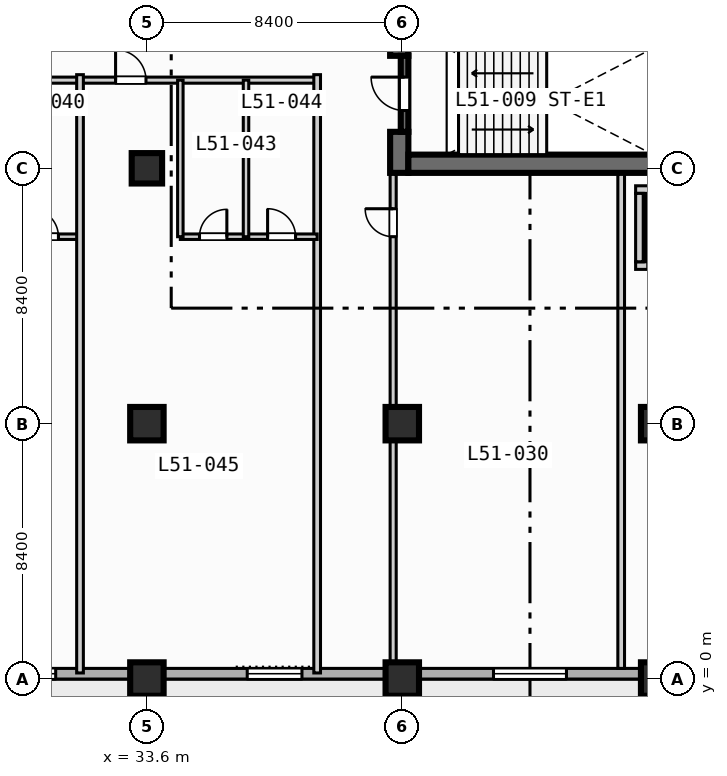
"""IFC4 building model, lengths in metres.
Left out: names, types, materials, properties, quantities, classifications, styles, units other than length and angle.
Written with IfcOpenShell. Run it as: python <this file> out.ifc"""

import sys

from ifc_helpers import new_model, si_unit, direction, frame, frame_2d, origin, origin_2d, place, context, subcontext, project, spatial, rectangle, extrude, element, fill, save


model = new_model("IFC4")
c1 = context("Model", 3, precision=1e-05, world=origin(), true_north=direction((0.0, 1.0)))
c2 = subcontext(c1, "Body", "Model", "MODEL_VIEW")
j1 = project(units=[si_unit("LENGTHUNIT", "METRE"), si_unit("PLANEANGLEUNIT", "RADIAN")], contexts=[c1])
p1 = place(None, origin())
s1 = spatial("IfcSite", under=j1, at=p1, CompositionType="ELEMENT")
p2 = place(p1, origin())
s2 = spatial("IfcBuilding", under=s1, at=p2, CompositionType="ELEMENT")
p3 = place(p2, frame((0.0, 0.0, 208.7)))
s3 = spatial("IfcBuildingStorey", under=s2, at=p3, CompositionType="ELEMENT", Elevation=208.7)
p4 = place(p3, frame((41.9, 16.65, 0.0), z_axis=(0.0, 0.0, 1.0), x_axis=(0.0, 1.0, 0.0)))
e1 = element("IfcWall", 1, at=p4, inside=s3, PredefinedType="SHEAR", context=c2, shape_type="SweptSolid", body=[
    extrude(rectangle(XDim=1.35, YDim=0.6, at=frame_2d((0.675, 0.0))), origin(), (0.0, 0.0, 1.0), 3.47),
])
p5 = place(p3, frame((41.9, 20.5, 0.0), z_axis=(0.0, 0.0, 1.0), x_axis=(0.0, 1.0, 0.0)))
e2 = element("IfcWall", 2, at=p5, inside=s3, PredefinedType="SHEAR", context=c2, shape_type="SweptSolid", body=[
    extrude(rectangle(XDim=5.0, YDim=0.6, at=frame_2d((2.5, 0.0))), origin(), (0.0, 0.0, 1.0), 3.47),
])
p6 = place(p3, frame((42.2, 16.95, 0.0), z_axis=(0.0, 0.0, 1.0), x_axis=(1.0, 0.0, 0.0)))
e3 = element("IfcWall", 3, at=p6, inside=s3, PredefinedType="SHEAR", context=c2, shape_type="SweptSolid", body=[
    extrude(rectangle(XDim=16.35, YDim=0.6, at=frame_2d((8.175, 0.0))), origin(), (0.0, 0.0, 1.0), 3.47),
])
for number, where, z_axis, x_axis in (
    (4, (33.6, 0.0, 0.0), (0.0, 0.0, 1.0), (1.0, 0.0, 0.0)),
    (5, (33.6, 8.4, 0.0), (0.0, 0.0, 1.0), (1.0, 0.0, 0.0)),
):
    element("IfcColumn", number, at=place(p3, frame(where, z_axis=z_axis, x_axis=x_axis)), inside=s3, PredefinedType="COLUMN", context=c2, shape_type="SweptSolid", body=[
        extrude(rectangle(XDim=1.1, YDim=1.1, at=origin_2d()), origin(), (0.0, 0.0, 1.0), 3.7),
    ])
p7 = place(p3, frame((33.6, 16.8, 0.0), z_axis=(0.0, 0.0, 1.0), x_axis=(1.0, 0.0, 0.0)))
e6 = element("IfcColumn", 6, at=p7, inside=s3, PredefinedType="COLUMN", context=c2, shape_type="SweptSolid", body=[
    extrude(rectangle(XDim=1.0, YDim=1.0, at=origin_2d()), origin(), (0.0, 0.0, 1.0), 3.7),
])
for number, where, z_axis, x_axis in (
    (7, (42.0, 0.0, 0.0), (0.0, 0.0, 1.0), (1.0, 0.0, 0.0)),
    (8, (42.0, 8.4, 0.0), (0.0, 0.0, 1.0), (1.0, 0.0, 0.0)),
    (9, (50.4, 0.0, 0.0), (0.0, 0.0, 1.0), (1.0, 0.0, 0.0)),
    (10, (50.4, 8.4, 0.0), (0.0, 0.0, 1.0), (1.0, 0.0, 0.0)),
):
    element("IfcColumn", number, at=place(p3, frame(where, z_axis=z_axis, x_axis=x_axis)), inside=s3, PredefinedType="COLUMN", context=c2, shape_type="SweptSolid", body=[
        extrude(rectangle(XDim=1.1, YDim=1.1, at=origin_2d()), origin(), (0.0, 0.0, 1.0), 3.7),
    ])
p8 = place(p3, frame((72.425, 0.175, 0.0), z_axis=(0.0, 0.0, 1.0), x_axis=(-1.0, 0.0, 0.0)))
e11 = element("IfcWall", 11, at=p8, inside=s3, PredefinedType="STANDARD", context=c2, shape_type="SweptSolid", body=[
    extrude(rectangle(XDim=69.25, YDim=0.35, at=frame_2d((34.625, 0.0))), origin(), (0.0, 0.0, 1.0), 3.47),
])
p9 = place(p8, frame((52.825, 0.0, 0.0)))
e12 = element("IfcOpeningElement", 12, at=p9, cuts=e11, PredefinedType="OPENING", context=c2, shape_type="SweptSolid", body=[
    extrude(rectangle(XDim=1.4, YDim=2.2, at=frame_2d((0.7, 1.1))), frame((0.0, 0.185, 0.0), z_axis=(0.0, -1.0, 0.0), x_axis=(1.0, 0.0, 0.0)), (0.0, 0.0, 1.0), 0.37),
])
p10 = place(p8, frame((41.825, 0.0, 0.85)))
e13 = element("IfcOpeningElement", 13, at=p10, cuts=e11, PredefinedType="OPENING", context=c2, shape_type="SweptSolid", body=[
    extrude(rectangle(XDim=2.4, YDim=1.95, at=frame_2d((1.2, 0.975))), frame((0.0, 0.185, 0.0), z_axis=(0.0, -1.0, 0.0), x_axis=(1.0, 0.0, 0.0)), (0.0, 0.0, 1.0), 0.37),
])
p11 = place(p8, frame((33.725, 0.0, 0.85)))
e14 = element("IfcOpeningElement", 14, at=p11, cuts=e11, PredefinedType="OPENING", context=c2, shape_type="SweptSolid", body=[
    extrude(rectangle(XDim=1.8, YDim=1.8, at=frame_2d((0.9, 0.9))), frame((0.0, 0.185, 0.0), z_axis=(0.0, -1.0, 0.0), x_axis=(1.0, 0.0, 0.0)), (0.0, 0.0, 1.0), 0.37),
])
p12 = place(p8, frame((25.025, 0.0, 0.85)))
e15 = element("IfcOpeningElement", 15, at=p12, cuts=e11, PredefinedType="OPENING", context=c2, shape_type="SweptSolid", body=[
    extrude(rectangle(XDim=2.4, YDim=1.95, at=frame_2d((1.2, 0.975))), frame((0.0, 0.185, 0.0), z_axis=(0.0, -1.0, 0.0), x_axis=(1.0, 0.0, 0.0)), (0.0, 0.0, 1.0), 0.37),
])
p13 = place(p8, frame((64.675, 0.0, 0.85)))
e16 = element("IfcOpeningElement", 16, at=p13, cuts=e11, PredefinedType="OPENING", context=c2, shape_type="SweptSolid", body=[
    extrude(rectangle(XDim=1.8, YDim=1.8, at=frame_2d((0.9, 0.9))), frame((0.0, 0.185, 0.0), z_axis=(0.0, -1.0, 0.0), x_axis=(1.0, 0.0, 0.0)), (0.0, 0.0, 1.0), 0.37),
])
p14 = place(p8, frame((50.275, 0.0, 0.85)))
e17 = element("IfcOpeningElement", 17, at=p14, cuts=e11, PredefinedType="OPENING", context=c2, shape_type="SweptSolid", body=[
    extrude(rectangle(XDim=1.8, YDim=1.8, at=frame_2d((0.9, 0.9))), frame((0.0, 0.185, 0.0), z_axis=(0.0, -1.0, 0.0), x_axis=(1.0, 0.0, 0.0)), (0.0, 0.0, 1.0), 0.37),
])
p15 = place(p3, frame((42.075, 18.0, 0.0), z_axis=(0.0, 0.0, 1.0), x_axis=(0.0, 1.0, 0.0)))
e18 = element("IfcWall", 18, at=p15, inside=s3, PredefinedType="SOLIDWALL", context=c2, shape_type="SweptSolid", body=[
    extrude(rectangle(XDim=2.5, YDim=0.25, at=frame_2d((1.25, 0.0))), origin(), (0.0, 0.0, 1.0), 3.47),
])
p16 = place(p15, frame((0.7, 0.0, 0.0)))
e19 = element("IfcOpeningElement", 19, at=p16, cuts=e18, PredefinedType="OPENING", context=c2, shape_type="SweptSolid", body=[
    extrude(rectangle(XDim=1.1, YDim=2.15, at=frame_2d((0.55, 1.075))), frame((0.0, 0.135, 0.0), z_axis=(0.0, -1.0, 0.0), x_axis=(1.0, 0.0, 0.0)), (0.0, 0.0, 1.0), 0.27),
])
p17 = place(p3, frame((49.675, 13.6, 0.0), z_axis=(0.0, 0.0, 1.0), x_axis=(1.0, 0.0, 0.0)))
e20 = element("IfcWall", 20, at=p17, inside=s3, PredefinedType="SOLIDWALL", context=c2, shape_type="SweptSolid", body=[
    extrude(rectangle(XDim=2.25, YDim=0.25, at=frame_2d((1.125, 0.0))), origin(), (0.0, 0.0, 1.0), 3.47),
])
p18 = place(p17, frame((0.4, 0.0, 0.0)))
e21 = element("IfcOpeningElement", 21, at=p18, cuts=e20, PredefinedType="OPENING", context=c2, shape_type="SweptSolid", body=[
    extrude(rectangle(XDim=1.1, YDim=2.15, at=frame_2d((0.55, 1.075))), frame((0.0, 0.135, 0.0), z_axis=(0.0, -1.0, 0.0), x_axis=(1.0, 0.0, 0.0)), (0.0, 0.0, 1.0), 0.27),
])
for number, where, z_axis, x_axis in (
    (22, (49.675, 16.1, 0.0), (0.0, 0.0, 1.0), (1.0, 0.0, 0.0)),
    (23, (49.8, 13.725, 0.0), (0.0, 0.0, 1.0), (0.0, 1.0, 0.0)),
):
    element("IfcWall", number, at=place(p3, frame(where, z_axis=z_axis, x_axis=x_axis)), inside=s3, PredefinedType="SOLIDWALL", context=c2, shape_type="SweptSolid", body=[
        extrude(rectangle(XDim=2.25, YDim=0.25, at=frame_2d((1.125, 0.0))), origin(), (0.0, 0.0, 1.0), 3.47),
    ])
p19 = place(p3, frame((41.7, 0.35, 0.0), z_axis=(0.0, 0.0, 1.0), x_axis=(0.0, 1.0, 0.0)))
e24 = element("IfcWall", 24, at=p19, inside=s3, PredefinedType="PARTITIONING", context=c2, shape_type="SweptSolid", body=[
    extrude(rectangle(XDim=16.25, YDim=0.2, at=frame_2d((8.125, 0.0))), origin(), (0.0, 0.0, 1.0), 2.82),
])
p20 = place(p19, frame((14.2, 0.0, 0.0)))
e25 = element("IfcOpeningElement", 25, at=p20, cuts=e24, PredefinedType="OPENING", context=c2, shape_type="SweptSolid", body=[
    extrude(rectangle(XDim=0.92, YDim=2.1, at=frame_2d((0.46, 1.05))), frame((0.0, 0.11, 0.0), z_axis=(0.0, -1.0, 0.0), x_axis=(1.0, 0.0, 0.0)), (0.0, 0.0, 1.0), 0.22),
])
p21 = place(p3, frame((49.2, 0.35, 0.0), z_axis=(0.0, 0.0, 1.0), x_axis=(0.0, 1.0, 0.0)))
e26 = element("IfcWall", 26, at=p21, inside=s3, PredefinedType="PARTITIONING", context=c2, shape_type="SweptSolid", body=[
    extrude(rectangle(XDim=16.25, YDim=0.22, at=frame_2d((8.125, 0.0))), origin(), (0.0, 0.0, 1.0), 3.47),
])
p22 = place(p3, frame((3.4, 19.7, 0.0), z_axis=(0.0, 0.0, 1.0), x_axis=(1.0, 0.0, 0.0)))
e27 = element("IfcWall", 27, at=p22, inside=s3, PredefinedType="PARTITIONING", context=c2, shape_type="SweptSolid", body=[
    extrude(rectangle(XDim=35.8, YDim=0.2, at=frame_2d((17.9, 0.0))), origin(), (0.0, 0.0, 1.0), 3.47),
])
p23 = place(p22, frame((1.47, 0.0, 0.0)))
e28 = element("IfcOpeningElement", 28, at=p23, cuts=e27, PredefinedType="OPENING", context=c2, shape_type="SweptSolid", body=[
    extrude(rectangle(XDim=1.0, YDim=2.15, at=frame_2d((0.5, 1.075))), frame((0.0, 0.11, 0.0), z_axis=(0.0, -1.0, 0.0), x_axis=(1.0, 0.0, 0.0)), (0.0, 0.0, 1.0), 0.22),
])
p24 = place(p22, frame((9.87, 0.0, 0.0)))
e29 = element("IfcOpeningElement", 29, at=p24, cuts=e27, PredefinedType="OPENING", context=c2, shape_type="SweptSolid", body=[
    extrude(rectangle(XDim=1.0, YDim=2.15, at=frame_2d((0.5, 1.075))), frame((0.0, 0.11, 0.0), z_axis=(0.0, -1.0, 0.0), x_axis=(1.0, 0.0, 0.0)), (0.0, 0.0, 1.0), 0.22),
])
p25 = place(p22, frame((20.72, 0.0, 0.0)))
e30 = element("IfcOpeningElement", 30, at=p25, cuts=e27, PredefinedType="OPENING", context=c2, shape_type="SweptSolid", body=[
    extrude(rectangle(XDim=1.0, YDim=2.15, at=frame_2d((0.5, 1.075))), frame((0.0, 0.11, 0.0), z_axis=(0.0, -1.0, 0.0), x_axis=(1.0, 0.0, 0.0)), (0.0, 0.0, 1.0), 0.22),
])
p26 = place(p22, frame((29.17, 0.0, 0.0)))
e31 = element("IfcOpeningElement", 31, at=p26, cuts=e27, PredefinedType="OPENING", context=c2, shape_type="SweptSolid", body=[
    extrude(rectangle(XDim=1.0, YDim=2.15, at=frame_2d((0.5, 1.075))), frame((0.0, 0.11, 0.0), z_axis=(0.0, -1.0, 0.0), x_axis=(1.0, 0.0, 0.0)), (0.0, 0.0, 1.0), 0.22),
])
p27 = place(p3, frame((26.9, 14.55, 0.0), z_axis=(0.0, 0.0, 1.0), x_axis=(1.0, 0.0, 0.0)))
e32 = element("IfcWall", 32, at=p27, inside=s3, PredefinedType="PLUMBINGWALL", context=c2, shape_type="SweptSolid", body=[
    extrude(rectangle(XDim=4.5, YDim=0.18, at=frame_2d((2.25, 0.0))), origin(), (0.0, 0.0, 1.0), 3.47),
])
p28 = place(p27, frame((0.63, 0.0, 0.0)))
e33 = element("IfcOpeningElement", 33, at=p28, cuts=e32, PredefinedType="OPENING", context=c2, shape_type="SweptSolid", body=[
    extrude(rectangle(XDim=0.9, YDim=2.1, at=frame_2d((0.45, 1.05))), frame((0.0, 0.1, 0.0), z_axis=(0.0, -1.0, 0.0), x_axis=(1.0, 0.0, 0.0)), (0.0, 0.0, 1.0), 0.2),
])
p29 = place(p27, frame((2.87, 0.0, 0.0)))
e34 = element("IfcOpeningElement", 34, at=p29, cuts=e32, PredefinedType="OPENING", context=c2, shape_type="SweptSolid", body=[
    extrude(rectangle(XDim=0.92, YDim=2.1, at=frame_2d((0.46, 1.05))), frame((0.0, 0.1, 0.0), z_axis=(0.0, -1.0, 0.0), x_axis=(1.0, 0.0, 0.0)), (0.0, 0.0, 1.0), 0.2),
])
for number, where, z_axis, x_axis in (
    (35, (31.4, 0.2, 0.0), (0.0, 0.0, 1.0), (0.0, 1.0, 0.0)),
    (36, (39.2, 0.2, 0.0), (0.0, 0.0, 1.0), (0.0, 1.0, 0.0)),
):
    element("IfcWall", number, at=place(p3, frame(where, z_axis=z_axis, x_axis=x_axis)), inside=s3, PredefinedType="PARTITIONING", context=c2, shape_type="SweptSolid", body=[
        extrude(rectangle(XDim=19.68, YDim=0.22, at=frame_2d((9.84, 0.0))), origin(), (0.0, 0.0, 1.0), 3.47),
    ])
p30 = place(p3, frame((34.7, 14.55, 0.0), z_axis=(0.0, 0.0, 1.0), x_axis=(1.0, 0.0, 0.0)))
e37 = element("IfcWall", 37, at=p30, inside=s3, PredefinedType="PLUMBINGWALL", context=c2, shape_type="SweptSolid", body=[
    extrude(rectangle(XDim=4.5, YDim=0.18, at=frame_2d((2.25, 0.0))), origin(), (0.0, 0.0, 1.0), 3.47),
])
p31 = place(p30, frame((0.63, 0.0, 0.0)))
e38 = element("IfcOpeningElement", 38, at=p31, cuts=e37, PredefinedType="OPENING", context=c2, shape_type="SweptSolid", body=[
    extrude(rectangle(XDim=0.9, YDim=2.1, at=frame_2d((0.45, 1.05))), frame((0.0, 0.1, 0.0), z_axis=(0.0, -1.0, 0.0), x_axis=(1.0, 0.0, 0.0)), (0.0, 0.0, 1.0), 0.2),
])
p32 = place(p30, frame((2.87, 0.0, 0.0)))
e39 = element("IfcOpeningElement", 39, at=p32, cuts=e37, PredefinedType="OPENING", context=c2, shape_type="SweptSolid", body=[
    extrude(rectangle(XDim=0.92, YDim=2.1, at=frame_2d((0.46, 1.05))), frame((0.0, 0.1, 0.0), z_axis=(0.0, -1.0, 0.0), x_axis=(1.0, 0.0, 0.0)), (0.0, 0.0, 1.0), 0.2),
])
for number, where, z_axis, x_axis in (
    (40, (34.7, 14.55, 0.0), (0.0, 0.0, 1.0), (0.0, 1.0, 0.0)),
    (41, (36.86, 14.55, 0.0), (0.0, 0.0, 1.0), (0.0, 1.0, 0.0)),
):
    element("IfcWall", number, at=place(p3, frame(where, z_axis=z_axis, x_axis=x_axis)), inside=s3, PredefinedType="PLUMBINGWALL", context=c2, shape_type="SweptSolid", body=[
        extrude(rectangle(XDim=5.15, YDim=0.18, at=frame_2d((2.575, 0.0))), origin(), (0.0, 0.0, 1.0), 3.47),
    ])
p33 = place(p10, origin())
e42 = element("IfcWindow", 42, at=p33, inside=s3, PartitioningType="SINGLE_PANEL", PredefinedType="WINDOW", context=c2, shape_type="SweptSolid", body=[
    extrude(rectangle(XDim=2.4, YDim=1.95, at=frame_2d((1.2, 0.975))), frame((0.0, 0.03, 0.0), z_axis=(0.0, -1.0, 0.0), x_axis=(1.0, 0.0, 0.0)), (0.0, 0.0, 1.0), 0.06),
])
fill(e13, e42)
p34 = place(p11, origin())
e43 = element("IfcWindow", 43, at=p34, inside=s3, PartitioningType="SINGLE_PANEL", PredefinedType="WINDOW", context=c2, shape_type="SweptSolid", body=[
    extrude(rectangle(XDim=1.8, YDim=1.8, at=frame_2d((0.9, 0.9))), frame((0.0, 0.03, 0.0), z_axis=(0.0, -1.0, 0.0), x_axis=(1.0, 0.0, 0.0)), (0.0, 0.0, 1.0), 0.06),
])
fill(e14, e43)
p35 = place(p12, origin())
e44 = element("IfcWindow", 44, at=p35, inside=s3, PartitioningType="SINGLE_PANEL", PredefinedType="WINDOW", context=c2, shape_type="SweptSolid", body=[
    extrude(rectangle(XDim=2.4, YDim=1.95, at=frame_2d((1.2, 0.975))), frame((0.0, 0.03, 0.0), z_axis=(0.0, -1.0, 0.0), x_axis=(1.0, 0.0, 0.0)), (0.0, 0.0, 1.0), 0.06),
])
fill(e15, e44)
p36 = place(p16, origin())
e45 = element("IfcDoor", 45, at=p36, inside=s3, OperationType="SINGLE_SWING_RIGHT", PredefinedType="DOOR", context=c2, shape_type="SweptSolid", body=[
    extrude(rectangle(XDim=1.1, YDim=2.15, at=frame_2d((0.55, 1.075))), frame((0.0, 0.025, 0.0), z_axis=(0.0, -1.0, 0.0), x_axis=(1.0, 0.0, 0.0)), (0.0, 0.0, 1.0), 0.05),
])
fill(e19, e45)
p37 = place(p20, origin())
e46 = element("IfcDoor", 46, at=p37, inside=s3, OperationType="SINGLE_SWING_RIGHT", PredefinedType="DOOR", context=c2, shape_type="SweptSolid", body=[
    extrude(rectangle(XDim=0.92, YDim=2.1, at=frame_2d((0.46, 1.05))), frame((0.0, 0.025, 0.0), z_axis=(0.0, -1.0, 0.0), x_axis=(1.0, 0.0, 0.0)), (0.0, 0.0, 1.0), 0.05),
])
fill(e25, e46)
p38 = place(p26, origin())
e47 = element("IfcDoor", 47, at=p38, inside=s3, OperationType="SINGLE_SWING_LEFT", PredefinedType="DOOR", context=c2, shape_type="SweptSolid", body=[
    extrude(rectangle(XDim=1.0, YDim=2.15, at=frame_2d((0.5, 1.075))), frame((0.0, 0.025, 0.0), z_axis=(0.0, -1.0, 0.0), x_axis=(1.0, 0.0, 0.0)), (0.0, 0.0, 1.0), 0.05),
])
fill(e31, e47)
p39 = place(p29, origin())
e48 = element("IfcDoor", 48, at=p39, inside=s3, OperationType="SINGLE_SWING_LEFT", PredefinedType="DOOR", context=c2, shape_type="SweptSolid", body=[
    extrude(rectangle(XDim=0.92, YDim=2.1, at=frame_2d((0.46, 1.05))), frame((0.0, 0.025, 0.0), z_axis=(0.0, -1.0, 0.0), x_axis=(1.0, 0.0, 0.0)), (0.0, 0.0, 1.0), 0.05),
])
fill(e34, e48)
p40 = place(p31, origin())
e49 = element("IfcDoor", 49, at=p40, inside=s3, OperationType="SINGLE_SWING_RIGHT", PredefinedType="DOOR", context=c2, shape_type="SweptSolid", body=[
    extrude(rectangle(XDim=0.9, YDim=2.1, at=frame_2d((0.45, 1.05))), frame((0.0, 0.025, 0.0), z_axis=(0.0, -1.0, 0.0), x_axis=(1.0, 0.0, 0.0)), (0.0, 0.0, 1.0), 0.05),
])
fill(e38, e49)
p41 = place(p32, origin())
e50 = element("IfcDoor", 50, at=p41, inside=s3, OperationType="SINGLE_SWING_LEFT", PredefinedType="DOOR", context=c2, shape_type="SweptSolid", body=[
    extrude(rectangle(XDim=0.92, YDim=2.1, at=frame_2d((0.46, 1.05))), frame((0.0, 0.025, 0.0), z_axis=(0.0, -1.0, 0.0), x_axis=(1.0, 0.0, 0.0)), (0.0, 0.0, 1.0), 0.05),
])
fill(e39, e50)
save(model, sys.argv[1])
